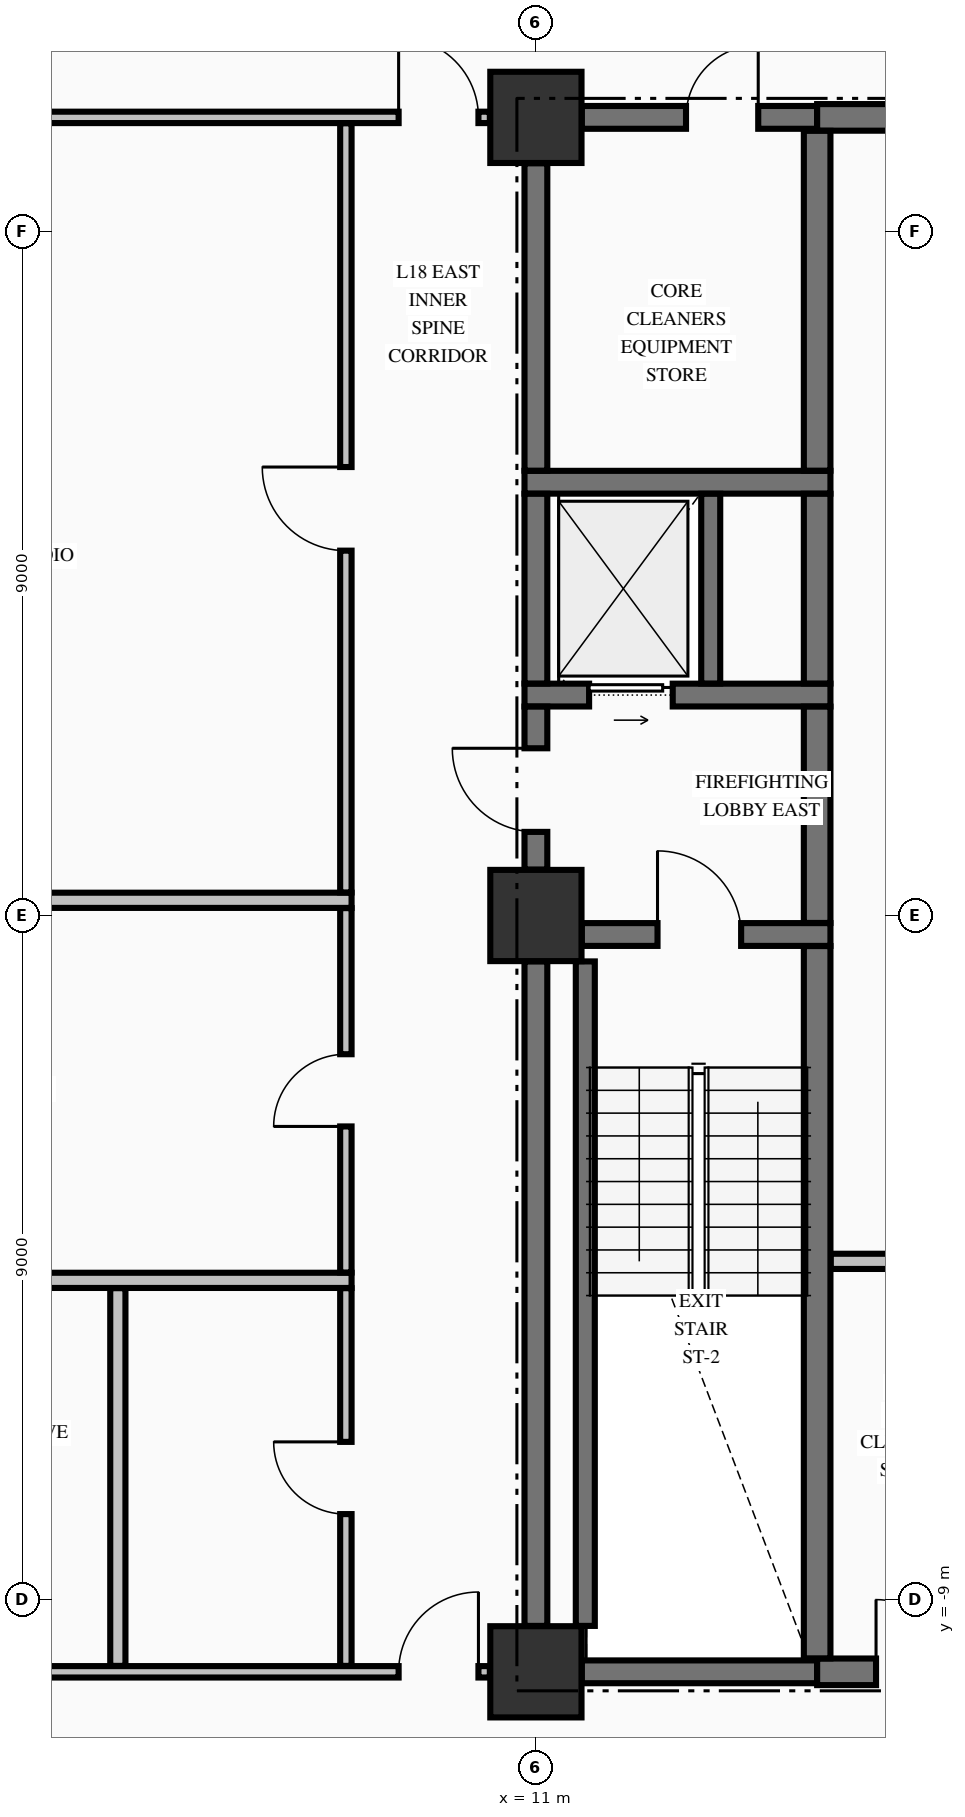
"""IFC4 building model, lengths in metres.
Left out: names, types, materials, properties, quantities, classifications, styles, units other than length and angle.
Written with IfcOpenShell. Run it as: python <this file> out.ifc"""

import sys

from ifc_helpers import new_model, si_unit, direction, frame, frame_2d, origin, origin_2d, place, context, subcontext, project, spatial, rectangle, extrude, element, fill, save


model = new_model("IFC4")
c1 = context("Model", 3, precision=1e-05, world=origin(), true_north=direction((0.0, 1.0)))
c2 = subcontext(c1, "Body", "Model", "MODEL_VIEW")
j1 = project(units=[si_unit("LENGTHUNIT", "METRE"), si_unit("PLANEANGLEUNIT", "RADIAN")], contexts=[c1])
p1 = place(None, origin())
s1 = spatial("IfcSite", under=j1, at=p1, CompositionType="ELEMENT")
p2 = place(p1, origin())
s2 = spatial("IfcBuilding", under=s1, at=p2, CompositionType="ELEMENT")
p3 = place(p2, frame((0.0, 0.0, 75.04)))
s3 = spatial("IfcBuildingStorey", under=s2, at=p3, CompositionType="ELEMENT", Elevation=75.04)
for number, where, z_axis, x_axis in (
    (1, (11.0, -9.95, -0.25), (0.0, 0.0, 1.0), (1.0, 0.0, 0.0)),
    (2, (11.0, 0.0, -0.25), (0.0, 0.0, 1.0), (1.0, 0.0, 0.0)),
    (3, (11.0, 10.5, -0.25), (0.0, 0.0, 1.0), (1.0, 0.0, 0.0)),
):
    element("IfcColumn", number, at=place(p3, frame(where, z_axis=z_axis, x_axis=x_axis)), inside=s3, PredefinedType="COLUMN", context=c2, shape_type="SweptSolid", body=[
        extrude(rectangle(XDim=1.2, YDim=1.2, at=origin_2d()), origin(), (0.0, 0.0, 1.0), 3.57),
    ])
p4 = place(p3, frame((11.604, -9.95, 0.0), z_axis=(0.0, 0.0, 1.0), x_axis=(1.0, 0.0, 0.0)))
e4 = element("IfcWall", 4, at=p4, inside=s3, PredefinedType="SHEAR", context=c2, shape_type="SweptSolid", body=[
    extrude(rectangle(XDim=3.096, YDim=0.3, at=frame_2d((1.548, 0.0))), origin(), (0.0, 0.0, 1.0), 3.32),
])
p5 = place(p3, frame((14.7, -9.95, 0.0), z_axis=(0.0, 0.0, 1.0), x_axis=(1.0, 0.0, 0.0)))
e5 = element("IfcWall", 5, at=p5, inside=s3, PredefinedType="SHEAR", context=c2, shape_type="SweptSolid", body=[
    extrude(rectangle(XDim=4.696, YDim=0.35, at=frame_2d((2.348, 0.0))), origin(), (0.0, 0.0, 1.0), 3.32),
])
p6 = place(p5, frame((0.775, 0.0, 0.0)))
e6 = element("IfcOpeningElement", 6, at=p6, cuts=e5, PredefinedType="OPENING", context=c2, shape_type="SweptSolid", body=[
    extrude(rectangle(XDim=0.95, YDim=2.15, at=frame_2d((0.475, 1.075))), frame((0.0, 0.185, 0.0), z_axis=(0.0, -1.0, 0.0), x_axis=(1.0, 0.0, 0.0)), (0.0, 0.0, 1.0), 0.37),
])
p7 = place(p3, frame((11.604, -0.25, 0.0), z_axis=(0.0, 0.0, 1.0), x_axis=(1.0, 0.0, 0.0)))
e7 = element("IfcWall", 7, at=p7, inside=s3, PredefinedType="SHEAR", context=c2, shape_type="SweptSolid", body=[
    extrude(rectangle(XDim=3.271, YDim=0.3, at=frame_2d((1.635, 0.0))), origin(), (0.0, 0.0, 1.0), 3.32),
])
p8 = place(p7, frame((0.996, 0.0, 0.0)))
e8 = element("IfcOpeningElement", 8, at=p8, cuts=e7, PredefinedType="OPENING", context=c2, shape_type="SweptSolid", body=[
    extrude(rectangle(XDim=1.1, YDim=2.15, at=frame_2d((0.55, 1.075))), frame((0.0, 0.16, 0.0), z_axis=(0.0, -1.0, 0.0), x_axis=(1.0, 0.0, 0.0)), (0.0, 0.0, 1.0), 0.32),
])
p9 = place(p3, frame((10.85, 2.9, 0.0), z_axis=(0.0, 0.0, 1.0), x_axis=(1.0, 0.0, 0.0)))
e9 = element("IfcWall", 9, at=p9, inside=s3, PredefinedType="SHEAR", context=c2, shape_type="SweptSolid", body=[
    extrude(rectangle(XDim=4.025, YDim=0.3, at=frame_2d((2.012, 0.0))), origin(), (0.0, 0.0, 1.0), 3.32),
])
p10 = place(p9, frame((0.85, 0.0, 0.0)))
e10 = element("IfcOpeningElement", 10, at=p10, cuts=e9, PredefinedType="OPENING", context=c2, shape_type="SweptSolid", body=[
    extrude(rectangle(XDim=1.1, YDim=2.2, at=frame_2d((0.55, 1.1))), frame((0.0, 0.16, 0.0), z_axis=(0.0, -1.0, 0.0), x_axis=(1.0, 0.0, 0.0)), (0.0, 0.0, 1.0), 0.32),
])
p11 = place(p3, frame((10.85, 5.7, 0.0), z_axis=(0.0, 0.0, 1.0), x_axis=(1.0, 0.0, 0.0)))
e11 = element("IfcWall", 11, at=p11, inside=s3, PredefinedType="SHEAR", context=c2, shape_type="SweptSolid", body=[
    extrude(rectangle(XDim=4.025, YDim=0.3, at=frame_2d((2.012, 0.0))), origin(), (0.0, 0.0, 1.0), 3.32),
])
p12 = place(p3, frame((11.604, 10.5, 0.0), z_axis=(0.0, 0.0, 1.0), x_axis=(1.0, 0.0, 0.0)))
e12 = element("IfcWall", 12, at=p12, inside=s3, PredefinedType="SHEAR", context=c2, shape_type="SweptSolid", body=[
    extrude(rectangle(XDim=3.096, YDim=0.3, at=frame_2d((1.548, 0.0))), origin(), (0.0, 0.0, 1.0), 3.32),
])
p13 = place(p12, frame((1.371, 0.0, 0.0)))
e13 = element("IfcOpeningElement", 13, at=p13, cuts=e12, PredefinedType="OPENING", context=c2, shape_type="SweptSolid", body=[
    extrude(rectangle(XDim=0.95, YDim=2.15, at=frame_2d((0.475, 1.075))), frame((0.0, 0.16, 0.0), z_axis=(0.0, -1.0, 0.0), x_axis=(1.0, 0.0, 0.0)), (0.0, 0.0, 1.0), 0.32),
])
p14 = place(p3, frame((14.7, 10.5, 0.0), z_axis=(0.0, 0.0, 1.0), x_axis=(1.0, 0.0, 0.0)))
e14 = element("IfcWall", 14, at=p14, inside=s3, PredefinedType="SHEAR", context=c2, shape_type="SweptSolid", body=[
    extrude(rectangle(XDim=4.696, YDim=0.35, at=frame_2d((2.348, 0.0))), origin(), (0.0, 0.0, 1.0), 3.32),
])
p15 = place(p14, frame((2.125, 0.0, 0.0)))
e15 = element("IfcOpeningElement", 15, at=p15, cuts=e14, PredefinedType="OPENING", context=c2, shape_type="SweptSolid", body=[
    extrude(rectangle(XDim=1.05, YDim=2.15, at=frame_2d((0.525, 1.075))), frame((0.0, 0.185, 0.0), z_axis=(0.0, -1.0, 0.0), x_axis=(1.0, 0.0, 0.0)), (0.0, 0.0, 1.0), 0.37),
])
p16 = place(p3, frame((-10.394, -9.95, 0.0), z_axis=(0.0, 0.0, 1.0), x_axis=(1.0, 0.0, 0.0)))
e16 = element("IfcWall", 16, at=p16, inside=s3, PredefinedType="PARTITIONING", context=c2, shape_type="SweptSolid", body=[
    extrude(rectangle(XDim=20.788, YDim=0.15, at=frame_2d((10.394, 0.0))), origin(), (0.0, 0.0, 1.0), 3.32),
])
p17 = place(p16, frame((0.15, 0.0, 0.0)))
e17 = element("IfcOpeningElement", 17, at=p17, cuts=e16, PredefinedType="OPENING", context=c2, shape_type="SweptSolid", body=[
    extrude(rectangle(XDim=1.05, YDim=2.15, at=frame_2d((0.525, 1.075))), frame((0.0, 0.085, 0.0), z_axis=(0.0, -1.0, 0.0), x_axis=(1.0, 0.0, 0.0)), (0.0, 0.0, 1.0), 0.17),
])
p18 = place(p16, frame((19.588, 0.0, 0.0)))
e18 = element("IfcOpeningElement", 18, at=p18, cuts=e16, PredefinedType="OPENING", context=c2, shape_type="SweptSolid", body=[
    extrude(rectangle(XDim=1.05, YDim=2.15, at=frame_2d((0.525, 1.075))), frame((0.0, 0.085, 0.0), z_axis=(0.0, -1.0, 0.0), x_axis=(1.0, 0.0, 0.0)), (0.0, 0.0, 1.0), 0.17),
])
p19 = place(p16, frame((11.769, 0.0, 0.0)))
e19 = element("IfcOpeningElement", 19, at=p19, cuts=e16, PredefinedType="OPENING", context=c2, shape_type="SweptSolid", body=[
    extrude(rectangle(XDim=0.95, YDim=2.15, at=frame_2d((0.475, 1.075))), frame((0.0, 0.085, 0.0), z_axis=(0.0, -1.0, 0.0), x_axis=(1.0, 0.0, 0.0)), (0.0, 0.0, 1.0), 0.17),
])
p20 = place(p3, frame((-1.9, -4.8, 0.0), z_axis=(0.0, 0.0, 1.0), x_axis=(1.0, 0.0, 0.0)))
e20 = element("IfcWall", 20, at=p20, inside=s3, PredefinedType="PARTITIONING", context=c2, shape_type="SweptSolid", body=[
    extrude(rectangle(XDim=10.475, YDim=0.2, at=frame_2d((5.237, 0.0))), origin(), (0.0, 0.0, 1.0), 3.32),
])
p21 = place(p3, frame((14.878, -4.55, 0.0), z_axis=(0.0, 0.0, 1.0), x_axis=(1.0, 0.0, 0.0)))
e21 = element("IfcWall", 21, at=p21, inside=s3, PredefinedType="PARTITIONING", context=c2, shape_type="SweptSolid", body=[
    extrude(rectangle(XDim=2.272, YDim=0.2, at=frame_2d((1.136, 0.0))), origin(), (0.0, 0.0, 1.0), 3.32),
])
p22 = place(p3, frame((-1.9, 0.2, 0.0), z_axis=(0.0, 0.0, 1.0), x_axis=(1.0, 0.0, 0.0)))
e22 = element("IfcWall", 22, at=p22, inside=s3, PredefinedType="PARTITIONING", context=c2, shape_type="SweptSolid", body=[
    extrude(rectangle(XDim=10.475, YDim=0.2, at=frame_2d((5.237, 0.0))), origin(), (0.0, 0.0, 1.0), 3.32),
])
p23 = place(p3, frame((-10.394, 10.5, 0.0), z_axis=(0.0, 0.0, 1.0), x_axis=(1.0, 0.0, 0.0)))
e23 = element("IfcWall", 23, at=p23, inside=s3, PredefinedType="PARTITIONING", context=c2, shape_type="SweptSolid", body=[
    extrude(rectangle(XDim=20.788, YDim=0.15, at=frame_2d((10.394, 0.0))), origin(), (0.0, 0.0, 1.0), 3.32),
])
p24 = place(p23, frame((0.15, 0.0, 0.0)))
e24 = element("IfcOpeningElement", 24, at=p24, cuts=e23, PredefinedType="OPENING", context=c2, shape_type="SweptSolid", body=[
    extrude(rectangle(XDim=1.05, YDim=2.15, at=frame_2d((0.525, 1.075))), frame((0.0, 0.085, 0.0), z_axis=(0.0, -1.0, 0.0), x_axis=(1.0, 0.0, 0.0)), (0.0, 0.0, 1.0), 0.17),
])
p25 = place(p23, frame((19.588, 0.0, 0.0)))
e25 = element("IfcOpeningElement", 25, at=p25, cuts=e23, PredefinedType="OPENING", context=c2, shape_type="SweptSolid", body=[
    extrude(rectangle(XDim=1.05, YDim=2.15, at=frame_2d((0.525, 1.075))), frame((0.0, 0.085, 0.0), z_axis=(0.0, -1.0, 0.0), x_axis=(1.0, 0.0, 0.0)), (0.0, 0.0, 1.0), 0.17),
])
p26 = place(p3, frame((11.0, -9.346, 0.0), z_axis=(0.0, 0.0, 1.0), x_axis=(0.0, 1.0, 0.0)))
e26 = element("IfcWall", 26, at=p26, inside=s3, PredefinedType="SHEAR", context=c2, shape_type="SweptSolid", body=[
    extrude(rectangle(XDim=8.742, YDim=0.3, at=frame_2d((4.371, 0.0))), origin(), (0.0, 0.0, 1.0), 3.32),
])
p27 = place(p3, frame((11.0, 0.604, 0.0), z_axis=(0.0, 0.0, 1.0), x_axis=(0.0, 1.0, 0.0)))
e27 = element("IfcWall", 27, at=p27, inside=s3, PredefinedType="SHEAR", context=c2, shape_type="SweptSolid", body=[
    extrude(rectangle(XDim=2.144, YDim=0.3, at=frame_2d((1.072, 0.0))), origin(), (0.0, 0.0, 1.0), 3.32),
])
p28 = place(p27, frame((0.496, 0.0, 0.0)))
e28 = element("IfcOpeningElement", 28, at=p28, cuts=e27, PredefinedType="OPENING", context=c2, shape_type="SweptSolid", body=[
    extrude(rectangle(XDim=1.1, YDim=2.15, at=frame_2d((0.55, 1.075))), frame((0.0, 0.16, 0.0), z_axis=(0.0, -1.0, 0.0), x_axis=(1.0, 0.0, 0.0)), (0.0, 0.0, 1.0), 0.32),
])
p29 = place(p3, frame((11.0, 3.052, 0.0), z_axis=(0.0, 0.0, 1.0), x_axis=(0.0, 1.0, 0.0)))
e29 = element("IfcWall", 29, at=p29, inside=s3, PredefinedType="SHEAR", context=c2, shape_type="SweptSolid", body=[
    extrude(rectangle(XDim=2.496, YDim=0.3, at=frame_2d((1.248, 0.0))), origin(), (0.0, 0.0, 1.0), 3.32),
])
p30 = place(p3, frame((11.0, 5.852, 0.0), z_axis=(0.0, 0.0, 1.0), x_axis=(0.0, 1.0, 0.0)))
e30 = element("IfcWall", 30, at=p30, inside=s3, PredefinedType="SHEAR", context=c2, shape_type="SweptSolid", body=[
    extrude(rectangle(XDim=4.044, YDim=0.3, at=frame_2d((2.022, 0.0))), origin(), (0.0, 0.0, 1.0), 3.32),
])
p31 = place(p3, frame((11.65, -9.346, 0.0), z_axis=(0.0, 0.0, 1.0), x_axis=(0.0, 1.0, 0.0)))
e31 = element("IfcWall", 31, at=p31, inside=s3, PredefinedType="SOLIDWALL", context=c2, shape_type="SweptSolid", body=[
    extrude(rectangle(XDim=8.742, YDim=0.25, at=frame_2d((4.371, 0.0))), origin(), (0.0, 0.0, 1.0), 3.32),
])
p32 = place(p3, frame((13.3, 3.052, 0.0), z_axis=(0.0, 0.0, 1.0), x_axis=(0.0, 1.0, 0.0)))
e32 = element("IfcWall", 32, at=p32, inside=s3, PredefinedType="SOLIDWALL", context=c2, shape_type="SweptSolid", body=[
    extrude(rectangle(XDim=2.496, YDim=0.25, at=frame_2d((1.248, 0.0))), origin(), (0.0, 0.0, 1.0), 3.32),
])
p33 = place(p3, frame((14.7, -9.773, 0.0), z_axis=(0.0, 0.0, 1.0), x_axis=(0.0, 1.0, 0.0)))
e33 = element("IfcWall", 33, at=p33, inside=s3, PredefinedType="SHEAR", context=c2, shape_type="SweptSolid", body=[
    extrude(rectangle(XDim=9.371, YDim=0.35, at=frame_2d((4.686, 0.0))), origin(), (0.0, 0.0, 1.0), 3.32),
])
p34 = place(p3, frame((14.7, -0.098, 0.0), z_axis=(0.0, 0.0, 1.0), x_axis=(0.0, 1.0, 0.0)))
e34 = element("IfcWall", 34, at=p34, inside=s3, PredefinedType="SHEAR", context=c2, shape_type="SweptSolid", body=[
    extrude(rectangle(XDim=2.846, YDim=0.35, at=frame_2d((1.423, 0.0))), origin(), (0.0, 0.0, 1.0), 3.32),
])
p35 = place(p3, frame((14.7, 3.052, 0.0), z_axis=(0.0, 0.0, 1.0), x_axis=(0.0, 1.0, 0.0)))
e35 = element("IfcWall", 35, at=p35, inside=s3, PredefinedType="SHEAR", context=c2, shape_type="SweptSolid", body=[
    extrude(rectangle(XDim=2.496, YDim=0.35, at=frame_2d((1.248, 0.0))), origin(), (0.0, 0.0, 1.0), 3.32),
])
p36 = place(p3, frame((14.7, 5.852, 0.0), z_axis=(0.0, 0.0, 1.0), x_axis=(0.0, 1.0, 0.0)))
e36 = element("IfcWall", 36, at=p36, inside=s3, PredefinedType="SHEAR", context=c2, shape_type="SweptSolid", body=[
    extrude(rectangle(XDim=4.471, YDim=0.35, at=frame_2d((2.235, 0.0))), origin(), (0.0, 0.0, 1.0), 3.32),
])
p37 = place(p3, frame((5.5, -9.872, 0.0), z_axis=(0.0, 0.0, 1.0), x_axis=(0.0, 1.0, 0.0)))
e37 = element("IfcWall", 37, at=p37, inside=s3, PredefinedType="PARTITIONING", context=c2, shape_type="SweptSolid", body=[
    extrude(rectangle(XDim=4.969, YDim=0.2, at=frame_2d((2.484, 0.0))), origin(), (0.0, 0.0, 1.0), 3.32),
])
p38 = place(p3, frame((8.5, -9.872, 0.0), z_axis=(0.0, 0.0, 1.0), x_axis=(0.0, 1.0, 0.0)))
e38 = element("IfcWall", 38, at=p38, inside=s3, PredefinedType="PARTITIONING", context=c2, shape_type="SweptSolid", body=[
    extrude(rectangle(XDim=4.969, YDim=0.15, at=frame_2d((2.484, 0.0))), origin(), (0.0, 0.0, 1.0), 3.32),
])
p39 = place(p38, frame((1.997, 0.0, 0.0)))
e39 = element("IfcOpeningElement", 39, at=p39, cuts=e38, PredefinedType="OPENING", context=c2, shape_type="SweptSolid", body=[
    extrude(rectangle(XDim=0.95, YDim=2.15, at=frame_2d((0.475, 1.075))), frame((0.0, 0.085, 0.0), z_axis=(0.0, -1.0, 0.0), x_axis=(1.0, 0.0, 0.0)), (0.0, 0.0, 1.0), 0.17),
])
p40 = place(p3, frame((8.5, -4.697, 0.0), z_axis=(0.0, 0.0, 1.0), x_axis=(0.0, 1.0, 0.0)))
e40 = element("IfcWall", 40, at=p40, inside=s3, PredefinedType="PARTITIONING", context=c2, shape_type="SweptSolid", body=[
    extrude(rectangle(XDim=4.794, YDim=0.15, at=frame_2d((2.397, 0.0))), origin(), (0.0, 0.0, 1.0), 3.32),
])
p41 = place(p40, frame((1.922, 0.0, 0.0)))
e41 = element("IfcOpeningElement", 41, at=p41, cuts=e40, PredefinedType="OPENING", context=c2, shape_type="SweptSolid", body=[
    extrude(rectangle(XDim=0.95, YDim=2.15, at=frame_2d((0.475, 1.075))), frame((0.0, 0.085, 0.0), z_axis=(0.0, -1.0, 0.0), x_axis=(1.0, 0.0, 0.0)), (0.0, 0.0, 1.0), 0.17),
])
p42 = place(p3, frame((8.5, 0.303, 0.0), z_axis=(0.0, 0.0, 1.0), x_axis=(0.0, 1.0, 0.0)))
e42 = element("IfcWall", 42, at=p42, inside=s3, PredefinedType="PARTITIONING", context=c2, shape_type="SweptSolid", body=[
    extrude(rectangle(XDim=10.119, YDim=0.15, at=frame_2d((5.06, 0.0))), origin(), (0.0, 0.0, 1.0), 3.32),
])
p43 = place(p42, frame((4.497, 0.0, 0.0)))
e43 = element("IfcOpeningElement", 43, at=p43, cuts=e42, PredefinedType="OPENING", context=c2, shape_type="SweptSolid", body=[
    extrude(rectangle(XDim=1.1, YDim=2.15, at=frame_2d((0.55, 1.075))), frame((0.0, 0.085, 0.0), z_axis=(0.0, -1.0, 0.0), x_axis=(1.0, 0.0, 0.0)), (0.0, 0.0, 1.0), 0.17),
])
p44 = place(p8, origin())
e44 = element("IfcDoor", 44, at=p44, inside=s3, OperationType="SINGLE_SWING_LEFT", PredefinedType="DOOR", context=c2, shape_type="SweptSolid", body=[
    extrude(rectangle(XDim=1.1, YDim=2.15, at=frame_2d((0.55, 1.075))), frame((0.0, 0.025, 0.0), z_axis=(0.0, -1.0, 0.0), x_axis=(1.0, 0.0, 0.0)), (0.0, 0.0, 1.0), 0.05),
])
fill(e8, e44)
p45 = place(p28, origin())
e45 = element("IfcDoor", 45, at=p45, inside=s3, OperationType="SINGLE_SWING_RIGHT", PredefinedType="DOOR", context=c2, shape_type="SweptSolid", body=[
    extrude(rectangle(XDim=1.1, YDim=2.15, at=frame_2d((0.55, 1.075))), frame((0.0, 0.025, 0.0), z_axis=(0.0, -1.0, 0.0), x_axis=(1.0, 0.0, 0.0)), (0.0, 0.0, 1.0), 0.05),
])
fill(e28, e45)
p46 = place(p10, origin())
e46 = element("IfcDoor", 46, at=p46, inside=s3, OperationType="SLIDING_TO_RIGHT", PredefinedType="DOOR", context=c2, shape_type="SweptSolid", body=[
    extrude(rectangle(XDim=1.1, YDim=2.2, at=frame_2d((0.55, 1.1))), frame((0.0, 0.025, 0.0), z_axis=(0.0, -1.0, 0.0), x_axis=(1.0, 0.0, 0.0)), (0.0, 0.0, 1.0), 0.05),
])
fill(e10, e46)
p47 = place(p13, origin())
e47 = element("IfcDoor", 47, at=p47, inside=s3, OperationType="SINGLE_SWING_RIGHT", PredefinedType="DOOR", context=c2, shape_type="SweptSolid", body=[
    extrude(rectangle(XDim=0.95, YDim=2.15, at=frame_2d((0.475, 1.075))), frame((0.0, 0.025, 0.0), z_axis=(0.0, -1.0, 0.0), x_axis=(1.0, 0.0, 0.0)), (0.0, 0.0, 1.0), 0.05),
])
fill(e13, e47)
p48 = place(p6, origin())
e48 = element("IfcDoor", 48, at=p48, inside=s3, OperationType="SINGLE_SWING_LEFT", PredefinedType="DOOR", context=c2, shape_type="SweptSolid", body=[
    extrude(rectangle(XDim=0.95, YDim=2.15, at=frame_2d((0.475, 1.075))), frame((0.0, 0.025, 0.0), z_axis=(0.0, -1.0, 0.0), x_axis=(1.0, 0.0, 0.0)), (0.0, 0.0, 1.0), 0.05),
])
fill(e6, e48)
p49 = place(p25, origin())
e49 = element("IfcDoor", 49, at=p49, inside=s3, OperationType="SINGLE_SWING_LEFT", PredefinedType="DOOR", context=c2, shape_type="SweptSolid", body=[
    extrude(rectangle(XDim=1.05, YDim=2.15, at=frame_2d((0.525, 1.075))), frame((0.0, 0.025, 0.0), z_axis=(0.0, -1.0, 0.0), x_axis=(1.0, 0.0, 0.0)), (0.0, 0.0, 1.0), 0.05),
])
fill(e25, e49)
p50 = place(p18, origin())
e50 = element("IfcDoor", 50, at=p50, inside=s3, OperationType="SINGLE_SWING_RIGHT", PredefinedType="DOOR", context=c2, shape_type="SweptSolid", body=[
    extrude(rectangle(XDim=1.05, YDim=2.15, at=frame_2d((0.525, 1.075))), frame((0.0, 0.025, 0.0), z_axis=(0.0, -1.0, 0.0), x_axis=(1.0, 0.0, 0.0)), (0.0, 0.0, 1.0), 0.05),
])
fill(e18, e50)
p51 = place(p43, origin())
e51 = element("IfcDoor", 51, at=p51, inside=s3, OperationType="SINGLE_SWING_RIGHT", PredefinedType="DOOR", context=c2, shape_type="SweptSolid", body=[
    extrude(rectangle(XDim=1.1, YDim=2.15, at=frame_2d((0.55, 1.075))), frame((0.0, 0.025, 0.0), z_axis=(0.0, -1.0, 0.0), x_axis=(1.0, 0.0, 0.0)), (0.0, 0.0, 1.0), 0.05),
])
fill(e43, e51)
p52 = place(p41, origin())
e52 = element("IfcDoor", 52, at=p52, inside=s3, OperationType="SINGLE_SWING_LEFT", PredefinedType="DOOR", context=c2, shape_type="SweptSolid", body=[
    extrude(rectangle(XDim=0.95, YDim=2.15, at=frame_2d((0.475, 1.075))), frame((0.0, 0.025, 0.0), z_axis=(0.0, -1.0, 0.0), x_axis=(1.0, 0.0, 0.0)), (0.0, 0.0, 1.0), 0.05),
])
fill(e41, e52)
p53 = place(p39, origin())
e53 = element("IfcDoor", 53, at=p53, inside=s3, OperationType="SINGLE_SWING_RIGHT", PredefinedType="DOOR", context=c2, shape_type="SweptSolid", body=[
    extrude(rectangle(XDim=0.95, YDim=2.15, at=frame_2d((0.475, 1.075))), frame((0.0, 0.025, 0.0), z_axis=(0.0, -1.0, 0.0), x_axis=(1.0, 0.0, 0.0)), (0.0, 0.0, 1.0), 0.05),
])
fill(e39, e53)
save(model, sys.argv[1])
